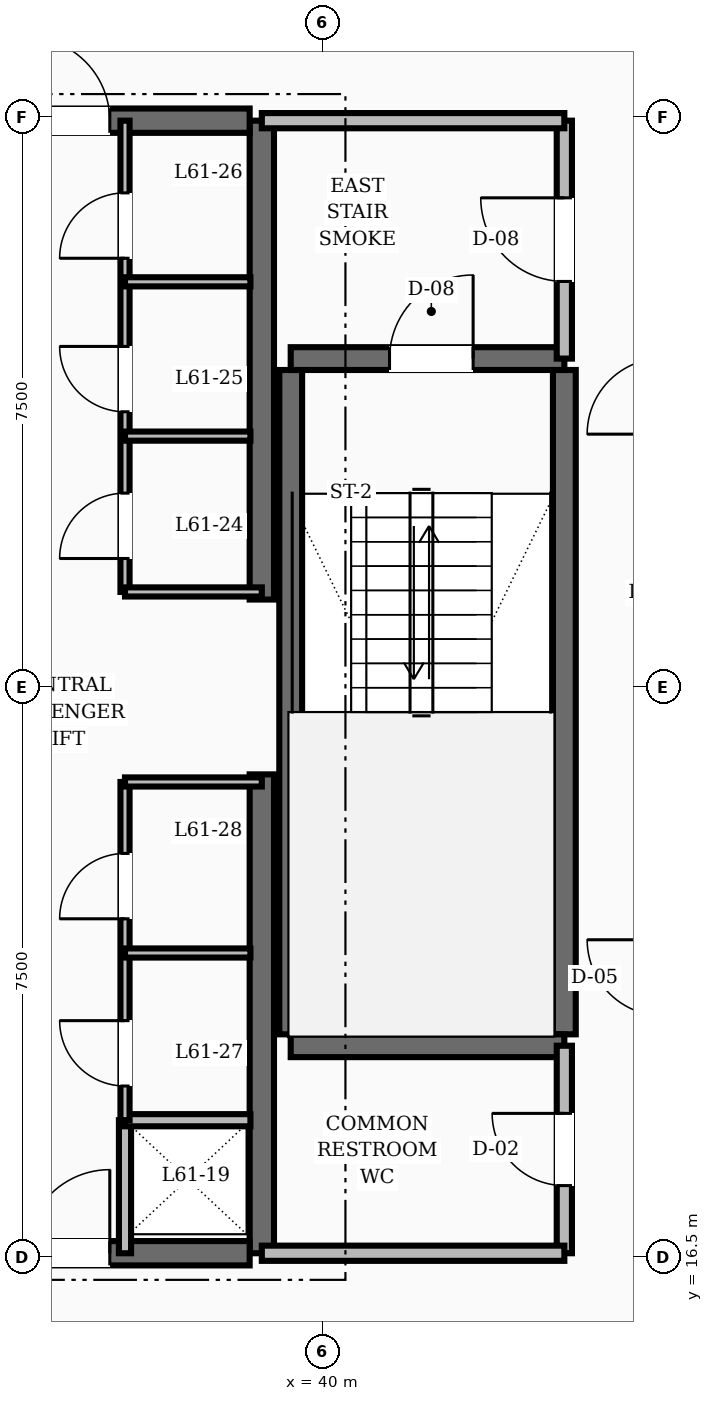
"""IFC4 building model, lengths in metres.
Left out: names, types, materials, properties, quantities, classifications, styles, units other than length and angle.
Written with IfcOpenShell. Run it as: python <this file> out.ifc"""

import sys

from ifc_helpers import new_model, si_unit, direction, frame, frame_2d, origin, place, context, subcontext, project, spatial, rectangle, extrude, element, fill, save


model = new_model("IFC4")
c1 = context("Model", 3, precision=1e-05, world=origin(), true_north=direction((0.0, 1.0)))
c2 = subcontext(c1, "Body", "Model", "MODEL_VIEW")
j1 = project(units=[si_unit("LENGTHUNIT", "METRE"), si_unit("PLANEANGLEUNIT", "RADIAN")], contexts=[c1])
p1 = place(None, origin())
s1 = spatial("IfcSite", under=j1, at=p1, CompositionType="ELEMENT")
p2 = place(p1, origin())
s2 = spatial("IfcBuilding", under=s1, at=p2, CompositionType="ELEMENT")
p3 = place(p2, frame((0.0, 0.0, 236.4)))
s3 = spatial("IfcBuildingStorey", under=s2, at=p3, CompositionType="ELEMENT", Elevation=236.4)
for number, where, z_axis, x_axis in (
    (1, (39.2, 16.55, 0.0), (0.0, 0.0, 1.0), (0.0, 1.0, 0.0)),
    (2, (39.2, 25.15, 0.0), (0.0, 0.0, 1.0), (0.0, 1.0, 0.0)),
):
    element("IfcWall", number, at=place(p3, frame(where, z_axis=z_axis, x_axis=x_axis)), inside=s3, PredefinedType="SHEAR", context=c2, shape_type="SweptSolid", body=[
        extrude(rectangle(XDim=6.3, YDim=0.32, at=frame_2d((3.15, 0.0))), origin(), (0.0, 0.0, 1.0), 3.6),
    ])
p4 = place(p3, frame((35.8, 16.55, 0.0), z_axis=(0.0, 0.0, 1.0), x_axis=(1.0, 0.0, 0.0)))
e3 = element("IfcWall", 3, at=p4, inside=s3, PredefinedType="SHEAR", context=c2, shape_type="SweptSolid", body=[
    extrude(rectangle(XDim=3.24, YDim=0.32, at=frame_2d((1.62, 0.0))), origin(), (0.0, 0.0, 1.0), 3.6),
])
p5 = place(p4, frame((0.3, 0.0, 0.0)))
e4 = element("IfcOpeningElement", 4, at=p5, cuts=e3, PredefinedType="OPENING", context=c2, shape_type="SweptSolid", body=[
    extrude(rectangle(XDim=1.1, YDim=2.1, at=frame_2d((0.55, 1.05))), frame((0.0, 0.17, 0.0), z_axis=(0.0, -1.0, 0.0), x_axis=(1.0, 0.0, 0.0)), (0.0, 0.0, 1.0), 0.34),
])
p6 = place(p3, frame((35.8, 31.45, 0.0), z_axis=(0.0, 0.0, 1.0), x_axis=(1.0, 0.0, 0.0)))
e5 = element("IfcWall", 5, at=p6, inside=s3, PredefinedType="SHEAR", context=c2, shape_type="SweptSolid", body=[
    extrude(rectangle(XDim=3.24, YDim=0.32, at=frame_2d((1.62, 0.0))), origin(), (0.0, 0.0, 1.0), 3.6),
])
p7 = place(p6, frame((0.3, 0.0, 0.0)))
e6 = element("IfcOpeningElement", 6, at=p7, cuts=e5, PredefinedType="OPENING", context=c2, shape_type="SweptSolid", body=[
    extrude(rectangle(XDim=1.1, YDim=2.1, at=frame_2d((0.55, 1.05))), frame((0.0, 0.17, 0.0), z_axis=(0.0, -1.0, 0.0), x_axis=(1.0, 0.0, 0.0)), (0.0, 0.0, 1.0), 0.34),
])
for number, where, z_axis, x_axis in (
    (7, (43.18, 19.43, 0.0), (0.0, 0.0, 1.0), (0.0, 1.0, 0.0)),
    (8, (39.58, 19.43, 0.0), (0.0, 0.0, 1.0), (0.0, 1.0, 0.0)),
):
    element("IfcWall", number, at=place(p3, frame(where, z_axis=z_axis, x_axis=x_axis)), inside=s3, PredefinedType="SHEAR", context=c2, shape_type="SweptSolid", body=[
        extrude(rectangle(XDim=8.74, YDim=0.3, at=frame_2d((4.37, 0.0))), origin(), (0.0, 0.0, 1.0), 3.6),
    ])
p8 = place(p3, frame((39.58, 19.28, 0.0), z_axis=(0.0, 0.0, 1.0), x_axis=(1.0, 0.0, 0.0)))
e9 = element("IfcWall", 9, at=p8, inside=s3, PredefinedType="SHEAR", context=c2, shape_type="SweptSolid", body=[
    extrude(rectangle(XDim=3.6, YDim=0.3, at=frame_2d((1.8, 0.0))), origin(), (0.0, 0.0, 1.0), 3.6),
])
p9 = place(p3, frame((39.58, 28.32, 0.0), z_axis=(0.0, 0.0, 1.0), x_axis=(1.0, 0.0, 0.0)))
e10 = element("IfcWall", 10, at=p9, inside=s3, PredefinedType="SHEAR", context=c2, shape_type="SweptSolid", body=[
    extrude(rectangle(XDim=3.6, YDim=0.3, at=frame_2d((1.8, 0.0))), origin(), (0.0, 0.0, 1.0), 3.6),
])
p10 = place(p9, frame((1.3, 0.0, 0.0)))
e11 = element("IfcOpeningElement", 11, at=p10, cuts=e10, PredefinedType="OPENING", context=c2, shape_type="SweptSolid", body=[
    extrude(rectangle(XDim=1.1, YDim=2.1, at=frame_2d((0.55, 1.05))), frame((0.0, 0.16, 0.0), z_axis=(0.0, -1.0, 0.0), x_axis=(1.0, 0.0, 0.0)), (0.0, 0.0, 1.0), 0.32),
])
p11 = place(p3, frame((43.18, 28.32, 0.0), z_axis=(0.0, 0.0, 1.0), x_axis=(0.0, 1.0, 0.0)))
e12 = element("IfcWall", 12, at=p11, inside=s3, PredefinedType="SOLIDWALL", context=c2, shape_type="SweptSolid", body=[
    extrude(rectangle(XDim=3.13, YDim=0.2, at=frame_2d((1.565, 0.0))), origin(), (0.0, 0.0, 1.0), 2.87),
])
p12 = place(p11, frame((1.015, 0.0, 0.0)))
e13 = element("IfcOpeningElement", 13, at=p12, cuts=e12, PredefinedType="OPENING", context=c2, shape_type="SweptSolid", body=[
    extrude(rectangle(XDim=1.1, YDim=2.1, at=frame_2d((0.55, 1.05))), frame((0.0, 0.11, 0.0), z_axis=(0.0, -1.0, 0.0), x_axis=(1.0, 0.0, 0.0)), (0.0, 0.0, 1.0), 0.22),
])
p13 = place(p3, frame((39.2, 31.45, 0.0), z_axis=(0.0, 0.0, 1.0), x_axis=(1.0, 0.0, 0.0)))
e14 = element("IfcWall", 14, at=p13, inside=s3, PredefinedType="SOLIDWALL", context=c2, shape_type="SweptSolid", body=[
    extrude(rectangle(XDim=3.98, YDim=0.2, at=frame_2d((1.99, 0.0))), origin(), (0.0, 0.0, 1.0), 2.87),
])
p14 = place(p3, frame((43.18, 16.55, 0.0), z_axis=(0.0, 0.0, 1.0), x_axis=(0.0, 1.0, 0.0)))
e15 = element("IfcWall", 15, at=p14, inside=s3, PredefinedType="SOLIDWALL", context=c2, shape_type="SweptSolid", body=[
    extrude(rectangle(XDim=2.73, YDim=0.2, at=frame_2d((1.365, 0.0))), origin(), (0.0, 0.0, 1.0), 2.87),
])
p15 = place(p14, frame((0.89, 0.0, 0.0)))
e16 = element("IfcOpeningElement", 16, at=p15, cuts=e15, PredefinedType="OPENING", context=c2, shape_type="SweptSolid", body=[
    extrude(rectangle(XDim=0.95, YDim=2.1, at=frame_2d((0.475, 1.05))), frame((0.0, 0.11, 0.0), z_axis=(0.0, -1.0, 0.0), x_axis=(1.0, 0.0, 0.0)), (0.0, 0.0, 1.0), 0.22),
])
p16 = place(p3, frame((39.2, 16.55, 0.0), z_axis=(0.0, 0.0, 1.0), x_axis=(1.0, 0.0, 0.0)))
e17 = element("IfcWall", 17, at=p16, inside=s3, PredefinedType="SOLIDWALL", context=c2, shape_type="SweptSolid", body=[
    extrude(rectangle(XDim=3.98, YDim=0.2, at=frame_2d((1.99, 0.0))), origin(), (0.0, 0.0, 1.0), 2.87),
])
p17 = place(p3, frame((37.4, 16.55, 0.0), z_axis=(0.0, 0.0, 1.0), x_axis=(0.0, 1.0, 0.0)))
e18 = element("IfcWall", 18, at=p17, inside=s3, PredefinedType="SOLIDWALL", context=c2, shape_type="SweptSolid", body=[
    extrude(rectangle(XDim=1.75, YDim=0.16, at=frame_2d((0.875, 0.0))), origin(), (0.0, 0.0, 1.0), 2.87),
])
p18 = place(p3, frame((37.4, 18.3, 0.0), z_axis=(0.0, 0.0, 1.0), x_axis=(1.0, 0.0, 0.0)))
e19 = element("IfcWall", 19, at=p18, inside=s3, PredefinedType="SOLIDWALL", context=c2, shape_type="SweptSolid", body=[
    extrude(rectangle(XDim=1.65, YDim=0.16, at=frame_2d((0.825, 0.0))), origin(), (0.0, 0.0, 1.0), 2.87),
])
p19 = place(p3, frame((37.4, 25.25, 0.0), z_axis=(0.0, 0.0, 1.0), x_axis=(0.0, 1.0, 0.0)))
e20 = element("IfcWall", 20, at=p19, inside=s3, PredefinedType="PARTITIONING", context=c2, shape_type="SweptSolid", body=[
    extrude(rectangle(XDim=6.2, YDim=0.12, at=frame_2d((3.1, 0.0))), origin(), (0.0, 0.0, 1.0), 2.87),
])
p20 = place(p19, frame((0.44, 0.0, 0.0)))
e21 = element("IfcOpeningElement", 21, at=p20, cuts=e20, PredefinedType="OPENING", context=c2, shape_type="SweptSolid", body=[
    extrude(rectangle(XDim=0.86, YDim=2.1, at=frame_2d((0.43, 1.05))), frame((0.0, 0.07, 0.0), z_axis=(0.0, -1.0, 0.0), x_axis=(1.0, 0.0, 0.0)), (0.0, 0.0, 1.0), 0.14),
])
p21 = place(p19, frame((2.37, 0.0, 0.0)))
e22 = element("IfcOpeningElement", 22, at=p21, cuts=e20, PredefinedType="OPENING", context=c2, shape_type="SweptSolid", body=[
    extrude(rectangle(XDim=0.86, YDim=2.1, at=frame_2d((0.43, 1.05))), frame((0.0, 0.07, 0.0), z_axis=(0.0, -1.0, 0.0), x_axis=(1.0, 0.0, 0.0)), (0.0, 0.0, 1.0), 0.14),
])
p22 = place(p19, frame((4.39, 0.0, 0.0)))
e23 = element("IfcOpeningElement", 23, at=p22, cuts=e20, PredefinedType="OPENING", context=c2, shape_type="SweptSolid", body=[
    extrude(rectangle(XDim=0.86, YDim=2.1, at=frame_2d((0.43, 1.05))), frame((0.0, 0.07, 0.0), z_axis=(0.0, -1.0, 0.0), x_axis=(1.0, 0.0, 0.0)), (0.0, 0.0, 1.0), 0.14),
])
p23 = place(p3, frame((37.4, 25.25, 0.0), z_axis=(0.0, 0.0, 1.0), x_axis=(1.0, 0.0, 0.0)))
e24 = element("IfcWall", 24, at=p23, inside=s3, PredefinedType="PARTITIONING", context=c2, shape_type="SweptSolid", body=[
    extrude(rectangle(XDim=1.8, YDim=0.12, at=frame_2d((0.9, 0.0))), origin(), (0.0, 0.0, 1.0), 2.87),
])
p24 = place(p3, frame((37.4, 18.3, 0.0), z_axis=(0.0, 0.0, 1.0), x_axis=(0.0, 1.0, 0.0)))
e25 = element("IfcWall", 25, at=p24, inside=s3, PredefinedType="PARTITIONING", context=c2, shape_type="SweptSolid", body=[
    extrude(rectangle(XDim=4.45, YDim=0.12, at=frame_2d((2.225, 0.0))), origin(), (0.0, 0.0, 1.0), 2.87),
])
p25 = place(p24, frame((0.45, 0.0, 0.0)))
e26 = element("IfcOpeningElement", 26, at=p25, cuts=e25, PredefinedType="OPENING", context=c2, shape_type="SweptSolid", body=[
    extrude(rectangle(XDim=0.86, YDim=2.1, at=frame_2d((0.43, 1.05))), frame((0.0, 0.07, 0.0), z_axis=(0.0, -1.0, 0.0), x_axis=(1.0, 0.0, 0.0)), (0.0, 0.0, 1.0), 0.14),
])
p26 = place(p24, frame((2.65, 0.0, 0.0)))
e27 = element("IfcOpeningElement", 27, at=p26, cuts=e25, PredefinedType="OPENING", context=c2, shape_type="SweptSolid", body=[
    extrude(rectangle(XDim=0.86, YDim=2.1, at=frame_2d((0.43, 1.05))), frame((0.0, 0.07, 0.0), z_axis=(0.0, -1.0, 0.0), x_axis=(1.0, 0.0, 0.0)), (0.0, 0.0, 1.0), 0.14),
])
p27 = place(p3, frame((37.4, 22.75, 0.0), z_axis=(0.0, 0.0, 1.0), x_axis=(1.0, 0.0, 0.0)))
e28 = element("IfcWall", 28, at=p27, inside=s3, PredefinedType="PARTITIONING", context=c2, shape_type="SweptSolid", body=[
    extrude(rectangle(XDim=1.8, YDim=0.12, at=frame_2d((0.9, 0.0))), origin(), (0.0, 0.0, 1.0), 2.87),
])
for number, where, z_axis, x_axis in (
    (29, (37.4, 27.3, 0.0), (0.0, 0.0, 1.0), (1.0, 0.0, 0.0)),
    (30, (37.4, 29.33, 0.0), (0.0, 0.0, 1.0), (1.0, 0.0, 0.0)),
    (31, (37.4, 20.5, 0.0), (0.0, 0.0, 1.0), (1.0, 0.0, 0.0)),
):
    element("IfcWall", number, at=place(p3, frame(where, z_axis=z_axis, x_axis=x_axis)), inside=s3, PredefinedType="PARTITIONING", context=c2, shape_type="SweptSolid", body=[
        extrude(rectangle(XDim=1.65, YDim=0.12, at=frame_2d((0.825, 0.0))), origin(), (0.0, 0.0, 1.0), 2.87),
    ])
for number, where, z_axis, x_axis in (
    (32, (44.427, 32.303, 0.0), (0.0, 0.0, 1.0), (-0.707, 0.707, 0.0)),
    (33, (42.365, 13.635, 0.0), (0.0, 0.0, 1.0), (0.707, 0.707, 0.0)),
):
    element("IfcWall", number, at=place(p3, frame(where, z_axis=z_axis, x_axis=x_axis)), inside=s3, PredefinedType="SOLIDWALL", context=c2, shape_type="SweptSolid", body=[
        extrude(rectangle(XDim=2.916, YDim=0.16, at=frame_2d((1.458, 0.0))), origin(), (0.0, 0.0, 1.0), 2.87),
    ])
p28 = place(p10, origin())
e34 = element("IfcDoor", 34, at=p28, inside=s3, OperationType="SINGLE_SWING_RIGHT", PredefinedType="DOOR", context=c2, shape_type="SweptSolid", body=[
    extrude(rectangle(XDim=1.1, YDim=2.1, at=frame_2d((0.55, 1.05))), frame((0.0, 0.025, 0.0), z_axis=(0.0, -1.0, 0.0), x_axis=(1.0, 0.0, 0.0)), (0.0, 0.0, 1.0), 0.05),
])
fill(e11, e34)
p29 = place(p12, origin())
e35 = element("IfcDoor", 35, at=p29, inside=s3, OperationType="SINGLE_SWING_RIGHT", PredefinedType="DOOR", context=c2, shape_type="SweptSolid", body=[
    extrude(rectangle(XDim=1.1, YDim=2.1, at=frame_2d((0.55, 1.05))), frame((0.0, 0.025, 0.0), z_axis=(0.0, -1.0, 0.0), x_axis=(1.0, 0.0, 0.0)), (0.0, 0.0, 1.0), 0.05),
])
fill(e13, e35)
p30 = place(p15, origin())
e36 = element("IfcDoor", 36, at=p30, inside=s3, OperationType="SINGLE_SWING_RIGHT", PredefinedType="DOOR", context=c2, shape_type="SweptSolid", body=[
    extrude(rectangle(XDim=0.95, YDim=2.1, at=frame_2d((0.475, 1.05))), frame((0.0, 0.025, 0.0), z_axis=(0.0, -1.0, 0.0), x_axis=(1.0, 0.0, 0.0)), (0.0, 0.0, 1.0), 0.05),
])
fill(e16, e36)
p31 = place(p7, origin())
e37 = element("IfcDoor", 37, at=p31, inside=s3, OperationType="SINGLE_SWING_LEFT", PredefinedType="DOOR", context=c2, shape_type="SweptSolid", body=[
    extrude(rectangle(XDim=1.1, YDim=2.1, at=frame_2d((0.55, 1.05))), frame((0.0, 0.025, 0.0), z_axis=(0.0, -1.0, 0.0), x_axis=(1.0, 0.0, 0.0)), (0.0, 0.0, 1.0), 0.05),
])
fill(e6, e37)
p32 = place(p5, origin())
e38 = element("IfcDoor", 38, at=p32, inside=s3, OperationType="SINGLE_SWING_RIGHT", PredefinedType="DOOR", context=c2, shape_type="SweptSolid", body=[
    extrude(rectangle(XDim=1.1, YDim=2.1, at=frame_2d((0.55, 1.05))), frame((0.0, 0.025, 0.0), z_axis=(0.0, -1.0, 0.0), x_axis=(1.0, 0.0, 0.0)), (0.0, 0.0, 1.0), 0.05),
])
fill(e4, e38)
p33 = place(p20, origin())
e39 = element("IfcDoor", 39, at=p33, inside=s3, OperationType="SINGLE_SWING_LEFT", PredefinedType="DOOR", context=c2, shape_type="SweptSolid", body=[
    extrude(rectangle(XDim=0.86, YDim=2.1, at=frame_2d((0.43, 1.05))), frame((0.0, 0.025, 0.0), z_axis=(0.0, -1.0, 0.0), x_axis=(1.0, 0.0, 0.0)), (0.0, 0.0, 1.0), 0.05),
])
fill(e21, e39)
p34 = place(p21, origin())
e40 = element("IfcDoor", 40, at=p34, inside=s3, OperationType="SINGLE_SWING_RIGHT", PredefinedType="DOOR", context=c2, shape_type="SweptSolid", body=[
    extrude(rectangle(XDim=0.86, YDim=2.1, at=frame_2d((0.43, 1.05))), frame((0.0, 0.025, 0.0), z_axis=(0.0, -1.0, 0.0), x_axis=(1.0, 0.0, 0.0)), (0.0, 0.0, 1.0), 0.05),
])
fill(e22, e40)
p35 = place(p22, origin())
e41 = element("IfcDoor", 41, at=p35, inside=s3, OperationType="SINGLE_SWING_LEFT", PredefinedType="DOOR", context=c2, shape_type="SweptSolid", body=[
    extrude(rectangle(XDim=0.86, YDim=2.1, at=frame_2d((0.43, 1.05))), frame((0.0, 0.025, 0.0), z_axis=(0.0, -1.0, 0.0), x_axis=(1.0, 0.0, 0.0)), (0.0, 0.0, 1.0), 0.05),
])
fill(e23, e41)
p36 = place(p25, origin())
e42 = element("IfcDoor", 42, at=p36, inside=s3, OperationType="SINGLE_SWING_RIGHT", PredefinedType="DOOR", context=c2, shape_type="SweptSolid", body=[
    extrude(rectangle(XDim=0.86, YDim=2.1, at=frame_2d((0.43, 1.05))), frame((0.0, 0.025, 0.0), z_axis=(0.0, -1.0, 0.0), x_axis=(1.0, 0.0, 0.0)), (0.0, 0.0, 1.0), 0.05),
])
fill(e26, e42)
p37 = place(p26, origin())
e43 = element("IfcDoor", 43, at=p37, inside=s3, OperationType="SINGLE_SWING_LEFT", PredefinedType="DOOR", context=c2, shape_type="SweptSolid", body=[
    extrude(rectangle(XDim=0.86, YDim=2.1, at=frame_2d((0.43, 1.05))), frame((0.0, 0.025, 0.0), z_axis=(0.0, -1.0, 0.0), x_axis=(1.0, 0.0, 0.0)), (0.0, 0.0, 1.0), 0.05),
])
fill(e27, e43)
save(model, sys.argv[1])
